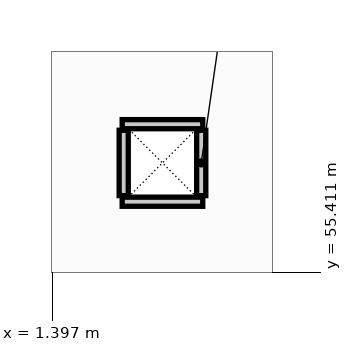
"""IFC4 building model, lengths in metres.
Left out: names, types, materials, properties, quantities, classifications, styles, units other than length and angle.
Written with IfcOpenShell. Run it as: python <this file> out.ifc"""

import sys

from ifc_helpers import new_model, si_unit, direction, frame, frame_2d, origin, place, context, subcontext, project, spatial, rectangle, extrude, element, save


model = new_model("IFC4")
c1 = context("Model", 3, precision=1e-05, world=origin(), true_north=direction((0.0, 1.0)))
c2 = subcontext(c1, "Body", "Model", "MODEL_VIEW")
j1 = project(units=[si_unit("LENGTHUNIT", "METRE"), si_unit("PLANEANGLEUNIT", "RADIAN")], contexts=[c1])
p1 = place(None, origin())
s1 = spatial("IfcSite", under=j1, at=p1, CompositionType="ELEMENT")
p2 = place(p1, origin())
s2 = spatial("IfcBuilding", under=s1, at=p2, CompositionType="ELEMENT")
p3 = place(p2, frame((0.0, 0.0, 9.0)))
s3 = spatial("IfcBuildingStorey", under=s2, at=p3, CompositionType="ELEMENT", Elevation=9.0)
for number, where, z_axis, x_axis in (
    (1, (2.32, 56.34, 0.0), (0.0, 0.0, 1.0), (1.0, 0.0, 0.0)),
    (2, (2.32, 57.36, 0.0), (0.0, 0.0, 1.0), (1.0, 0.0, 0.0)),
):
    element("IfcWall", number, at=place(p3, frame(where, z_axis=z_axis, x_axis=x_axis)), inside=s3, PredefinedType="PARTITIONING", context=c2, shape_type="SweptSolid", body=[
        extrude(rectangle(XDim=1.06, YDim=0.12, at=frame_2d((0.53, 0.0))), origin(), (0.0, 0.0, 1.0), 2.95),
    ])
for number, where, z_axis, x_axis in (
    (3, (2.34, 56.42, 0.0), (0.0, 0.0, 1.0), (0.0, 1.0, 0.0)),
    (4, (3.36, 56.42, 0.0), (0.0, 0.0, 1.0), (0.0, 1.0, 0.0)),
):
    element("IfcWall", number, at=place(p3, frame(where, z_axis=z_axis, x_axis=x_axis)), inside=s3, PredefinedType="PARTITIONING", context=c2, shape_type="SweptSolid", body=[
        extrude(rectangle(XDim=0.86, YDim=0.12, at=frame_2d((0.43, 0.0))), origin(), (0.0, 0.0, 1.0), 2.95),
    ])
save(model, sys.argv[1])
